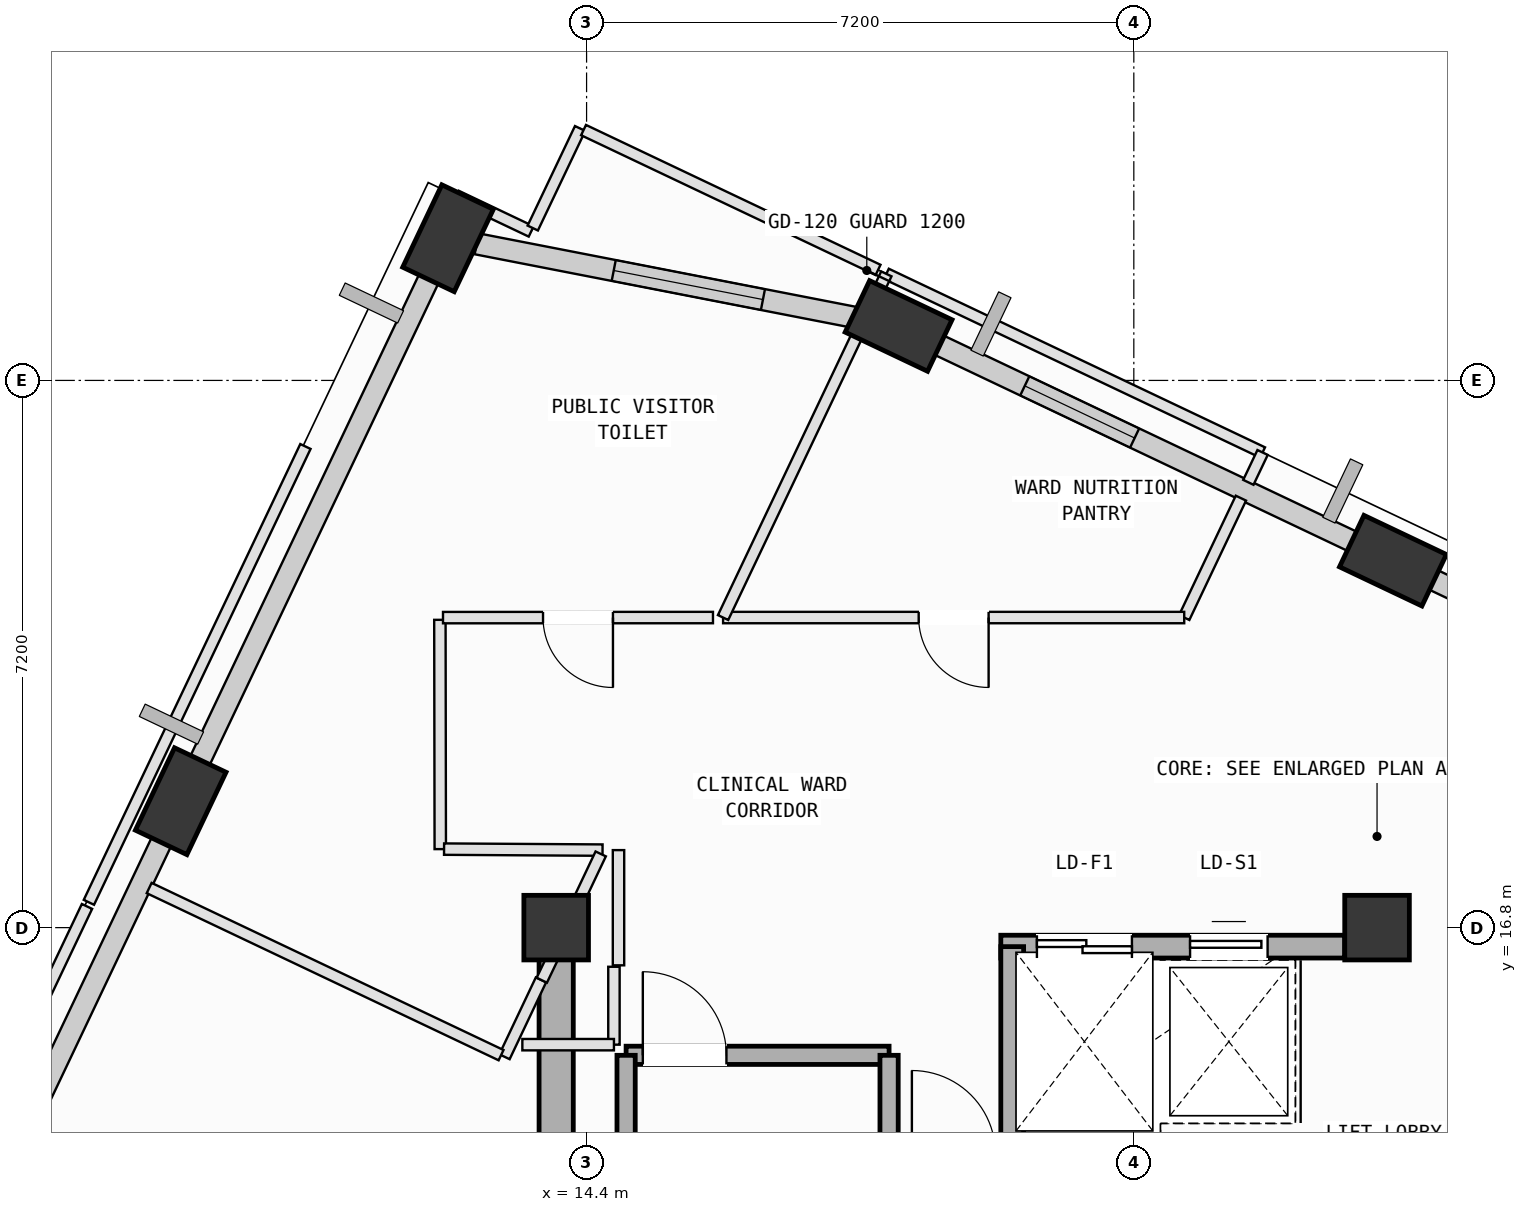
"""IFC4 building model, lengths in metres.
Left out: names, types, materials, properties, quantities, classifications, styles, units other than length and angle.
Written with IfcOpenShell. Run it as: python <this file> out.ifc"""

import sys

from ifc_helpers import new_model, si_unit, direction, frame, frame_2d, origin, origin_2d, place, context, subcontext, project, spatial, rectangle, extrude, element, fill, save


model = new_model("IFC4")
c1 = context("Model", 3, precision=1e-05, world=origin(), true_north=direction((0.0, 1.0)))
c2 = subcontext(c1, "Body", "Model", "MODEL_VIEW")
j1 = project(units=[si_unit("LENGTHUNIT", "METRE"), si_unit("PLANEANGLEUNIT", "RADIAN")], contexts=[c1])
p1 = place(None, origin())
s1 = spatial("IfcSite", under=j1, at=p1, CompositionType="ELEMENT")
p2 = place(p1, origin())
s2 = spatial("IfcBuilding", under=s1, at=p2, CompositionType="ELEMENT")
p3 = place(p2, frame((0.0, 0.0, 300.6)))
s3 = spatial("IfcBuildingStorey", under=s2, at=p3, CompositionType="ELEMENT", Elevation=300.6)
for number, where, z_axis, x_axis in (
    (1, (14.0, 16.8, 0.0), (0.0, 0.0, 1.0), (1.0, 0.0, 0.0)),
    (2, (24.8, 16.8, 0.0), (0.0, 0.0, 1.0), (1.0, 0.0, 0.0)),
):
    element("IfcColumn", number, at=place(p3, frame(where, z_axis=z_axis, x_axis=x_axis)), inside=s3, PredefinedType="COLUMN", context=c2, shape_type="SweptSolid", body=[
        extrude(rectangle(XDim=0.85, YDim=0.85, at=origin_2d()), origin(), (0.0, 0.0, 1.0), 4.0),
    ])
p4 = place(p3, frame((25.009, 21.628, 0.002), z_axis=(0.013491405719, -0.03546835621, 0.999279729445), x_axis=(-0.996704976374, 0.079462236708, 0.016277070029)))
e3 = element("IfcColumn", 3, at=p4, inside=s3, PredefinedType="COLUMN", context=c2, shape_type="SweptSolid", body=[
    extrude(rectangle(XDim=1.2, YDim=0.75, at=origin_2d()), origin(), (0.0, 0.0, 1.0), 3.999),
])
p5 = place(p3, frame((18.505, 24.717, 0.002), z_axis=(0.000853606278, -0.062435202046, 0.998048654576), x_axis=(-0.909103236129, 0.415708995205, 0.026783154524)))
e4 = element("IfcColumn", 4, at=p5, inside=s3, PredefinedType="COLUMN", context=c2, shape_type="SweptSolid", body=[
    extrude(rectangle(XDim=1.2, YDim=0.75, at=origin_2d()), origin(), (0.0, 0.0, 1.0), 4.004),
])
p6 = place(p3, frame((12.577, 25.871, 0.002), z_axis=(-0.003712450328, -0.086846993742, 0.996214744616), x_axis=(0.466977398551, 0.880775881553, 0.078523599749)))
e5 = element("IfcColumn", 5, at=p6, inside=s3, PredefinedType="COLUMN", context=c2, shape_type="SweptSolid", body=[
    extrude(rectangle(XDim=1.2, YDim=0.75, at=origin_2d()), origin(), (0.0, 0.0, 1.0), 4.011),
])
p7 = place(p3, frame((9.06, 18.463, 0.002), z_axis=(0.026915333163, -0.100917310121, 0.994530673915), x_axis=(0.182932695043, 0.978587726535, 0.094348770839)))
e6 = element("IfcColumn", 6, at=p7, inside=s3, PredefinedType="COLUMN", context=c2, shape_type="SweptSolid", body=[
    extrude(rectangle(XDim=1.2, YDim=0.75, at=origin_2d()), origin(), (0.0, 0.0, 1.0), 4.018),
])
p8 = place(p3, frame((25.415, 21.436, 0.0), z_axis=(0.0, 0.0, 1.0), x_axis=(0.903343787047, -0.428917244236, 0.0)))
e7 = element("IfcWall", 7, at=p8, inside=s3, PredefinedType="SOLIDWALL", context=c2, shape_type="SweptSolid", body=[
    extrude(rectangle(XDim=6.958, YDim=0.28, at=frame_2d((3.479, 0.0))), origin(), (0.0, 0.0, 1.0), 3.165),
])
p9 = place(p3, frame((18.899, 24.529, 0.0), z_axis=(0.0, 0.0, 1.0), x_axis=(0.903347453224, -0.428909522806, 0.0)))
e8 = element("IfcWall", 8, at=p9, inside=s3, PredefinedType="SOLIDWALL", context=c2, shape_type="SweptSolid", body=[
    extrude(rectangle(XDim=6.424, YDim=0.28, at=frame_2d((3.212, 0.0))), origin(), (0.0, 0.0, 1.0), 3.265),
])
p10 = place(p9, frame((1.401, 0.0, 0.75)))
e9 = element("IfcOpeningElement", 9, at=p10, cuts=e8, PredefinedType="OPENING", context=c2, shape_type="SweptSolid", body=[
    extrude(rectangle(XDim=1.6, YDim=1.95, at=frame_2d((0.8, 0.975))), frame((0.0, 0.15, 0.0), z_axis=(0.0, -1.0, 0.0), x_axis=(1.0, 0.0, 0.0)), (0.0, 0.0, 1.0), 0.3),
])
p11 = place(p3, frame((12.954, 25.798, 0.0), z_axis=(0.0, 0.0, 1.0), x_axis=(0.981565032418, -0.191128457152, 0.0)))
e10 = element("IfcWall", 10, at=p11, inside=s3, PredefinedType="SOLIDWALL", context=c2, shape_type="SweptSolid", body=[
    extrude(rectangle(XDim=5.302, YDim=0.28, at=frame_2d((2.651, 0.0))), origin(), (0.0, 0.0, 1.0), 3.265),
])
p12 = place(p11, frame((1.837, 0.0, 0.75)))
e11 = element("IfcOpeningElement", 11, at=p12, cuts=e10, PredefinedType="OPENING", context=c2, shape_type="SweptSolid", body=[
    extrude(rectangle(XDim=2.0, YDim=1.95, at=frame_2d((1.0, 0.975))), frame((0.0, 0.15, 0.0), z_axis=(0.0, -1.0, 0.0), x_axis=(1.0, 0.0, 0.0)), (0.0, 0.0, 1.0), 0.3),
])
p13 = place(p3, frame((9.152, 18.656, 0.0), z_axis=(0.0, 0.0, 1.0), x_axis=(0.428927525455, 0.903338905343, 0.0)))
e12 = element("IfcWall", 12, at=p13, inside=s3, PredefinedType="SOLIDWALL", context=c2, shape_type="SweptSolid", body=[
    extrude(rectangle(XDim=7.434, YDim=0.28, at=frame_2d((3.717, 0.0))), origin(), (0.0, 0.0, 1.0), 3.265),
])
p14 = place(p3, frame((5.621, 11.22, 0.0), z_axis=(0.0, 0.0, 1.0), x_axis=(0.428933056581, 0.903336279008, 0.0)))
e13 = element("IfcWall", 13, at=p14, inside=s3, PredefinedType="SOLIDWALL", context=c2, shape_type="SweptSolid", body=[
    extrude(rectangle(XDim=7.485, YDim=0.28, at=frame_2d((3.742, 0.0))), origin(), (0.0, 0.0, 1.0), 3.265),
])
p15 = place(p3, frame((14.92, 15.12, 0.0), z_axis=(0.0, 0.0, 1.0), x_axis=(1.0, 0.0, 0.0)))
e14 = element("IfcWall", 14, at=p15, inside=s3, PredefinedType="SOLIDWALL", context=c2, shape_type="SweptSolid", body=[
    extrude(rectangle(XDim=3.46, YDim=0.24, at=frame_2d((1.73, 0.0))), origin(), (0.0, 0.0, 1.0), 3.78),
])
p16 = place(p15, frame((0.22, 0.0, 0.0)))
e15 = element("IfcOpeningElement", 15, at=p16, cuts=e14, PredefinedType="OPENING", context=c2, shape_type="SweptSolid", body=[
    extrude(rectangle(XDim=1.1, YDim=2.15, at=frame_2d((0.55, 1.075))), frame((0.0, 0.13, 0.0), z_axis=(0.0, -1.0, 0.0), x_axis=(1.0, 0.0, 0.0)), (0.0, 0.0, 1.0), 0.26),
])
for number, where, z_axis, x_axis in (
    (16, (18.38, 15.12, 0.0), (0.0, 0.0, 1.0), (0.0, -1.0, 0.0)),
    (17, (14.92, 8.025, 0.0), (0.0, 0.0, 1.0), (0.0, 1.0, 0.0)),
):
    element("IfcWall", number, at=place(p3, frame(where, z_axis=z_axis, x_axis=x_axis)), inside=s3, PredefinedType="SOLIDWALL", context=c2, shape_type="SweptSolid", body=[
        extrude(rectangle(XDim=7.095, YDim=0.24, at=frame_2d((3.548, 0.0))), origin(), (0.0, 0.0, 1.0), 3.78),
    ])
p17 = place(p3, frame((14.0, 16.8, 0.0), z_axis=(0.0, 0.0, 1.0), x_axis=(0.0, -1.0, 0.0)))
e18 = element("IfcWall", 18, at=p17, inside=s3, PredefinedType="SHEAR", context=c2, shape_type="SweptSolid", body=[
    extrude(rectangle(XDim=9.0, YDim=0.45, at=frame_2d((4.5, 0.0))), origin(), (0.0, 0.0, 1.0), 3.78),
])
p18 = place(p3, frame((19.85, 16.55, 0.0), z_axis=(0.0, 0.0, 1.0), x_axis=(1.0, 0.0, 0.0)))
e19 = element("IfcWall", 19, at=p18, inside=s3, PredefinedType="SOLIDWALL", context=c2, shape_type="SweptSolid", body=[
    extrude(rectangle(XDim=4.525, YDim=0.3, at=frame_2d((2.262, 0.0))), origin(), (0.0, 0.0, 1.0), 3.78),
])
p19 = place(p18, frame((0.475, 0.0, 0.0)))
e20 = element("IfcOpeningElement", 20, at=p19, cuts=e19, PredefinedType="OPENING", context=c2, shape_type="SweptSolid", body=[
    extrude(rectangle(XDim=1.25, YDim=2.18, at=frame_2d((0.625, 1.09))), frame((0.0, 0.16, 0.0), z_axis=(0.0, -1.0, 0.0), x_axis=(1.0, 0.0, 0.0)), (0.0, 0.0, 1.0), 0.32),
])
p20 = place(p18, frame((2.49, 0.0, 0.0)))
e21 = element("IfcOpeningElement", 21, at=p20, cuts=e19, PredefinedType="OPENING", context=c2, shape_type="SweptSolid", body=[
    extrude(rectangle(XDim=1.02, YDim=2.12, at=frame_2d((0.51, 1.06))), frame((0.0, 0.16, 0.0), z_axis=(0.0, -1.0, 0.0), x_axis=(1.0, 0.0, 0.0)), (0.0, 0.0, 1.0), 0.32),
])
p21 = place(p3, frame((20.0, 13.82, 0.0), z_axis=(0.0, 0.0, 1.0), x_axis=(0.0, 1.0, 0.0)))
e22 = element("IfcWall", 22, at=p21, inside=s3, PredefinedType="SOLIDWALL", context=c2, shape_type="SweptSolid", body=[
    extrude(rectangle(XDim=2.73, YDim=0.3, at=frame_2d((1.365, 0.0))), origin(), (0.0, 0.0, 1.0), 3.78),
])
p22 = place(p3, frame((18.344, 25.402, 0.0), z_axis=(0.0, 0.0, 1.0), x_axis=(0.90335735186, -0.42888867418, 0.0)))
e23 = element("IfcWall", 23, at=p22, inside=s3, PredefinedType="PARTITIONING", context=c2, shape_type="SweptSolid", body=[
    extrude(rectangle(XDim=5.479, YDim=0.15, at=frame_2d((2.74, 0.0))), origin(), (0.0, 0.0, 1.0), 3.78),
])
p23 = place(p3, frame((23.294, 23.052, 0.0), z_axis=(0.0, 0.0, 1.0), x_axis=(-0.429628756121, -0.903005610123, 0.0)))
e24 = element("IfcWall", 24, at=p23, inside=s3, PredefinedType="PARTITIONING", context=c2, shape_type="SweptSolid", body=[
    extrude(rectangle(XDim=0.435, YDim=0.15, at=frame_2d((0.218, 0.0))), origin(), (0.0, 0.0, 1.0), 3.78),
])
p24 = place(p3, frame((23.009, 22.451, 0.0), z_axis=(0.0, 0.0, 1.0), x_axis=(-0.428985229974, -0.90331150356, 0.0)))
e25 = element("IfcWall", 25, at=p24, inside=s3, PredefinedType="PARTITIONING", context=c2, shape_type="SweptSolid", body=[
    extrude(rectangle(XDim=1.739, YDim=0.15, at=frame_2d((0.87, 0.0))), origin(), (0.0, 0.0, 1.0), 3.78),
])
p25 = place(p3, frame((22.263, 20.88, 0.0), z_axis=(0.0, 0.0, 1.0), x_axis=(-1.0, 0.0, 0.0)))
e26 = element("IfcWall", 26, at=p25, inside=s3, PredefinedType="PARTITIONING", context=c2, shape_type="SweptSolid", body=[
    extrude(rectangle(XDim=6.067, YDim=0.15, at=frame_2d((3.033, 0.0))), origin(), (0.0, 0.0, 1.0), 3.415),
])
p26 = place(p25, frame((2.573, 0.0, 0.0)))
e27 = element("IfcOpeningElement", 27, at=p26, cuts=e26, PredefinedType="OPENING", context=c2, shape_type="SweptSolid", body=[
    extrude(rectangle(XDim=0.92, YDim=2.1, at=frame_2d((0.46, 1.05))), frame((0.0, 0.085, 0.0), z_axis=(0.0, -1.0, 0.0), x_axis=(1.0, 0.0, 0.0)), (0.0, 0.0, 1.0), 0.17),
])
p27 = place(p3, frame((16.196, 20.88, 0.0), z_axis=(0.0, 0.0, 1.0), x_axis=(0.429116927293, 0.903248948359, 0.0)))
e28 = element("IfcWall", 28, at=p27, inside=s3, PredefinedType="PARTITIONING", context=c2, shape_type="SweptSolid", body=[
    extrude(rectangle(XDim=4.225, YDim=0.15, at=frame_2d((2.112, 0.0))), origin(), (0.0, 0.0, 1.0), 3.78),
])
p28 = place(p3, frame((18.111, 24.911, 0.0), z_axis=(0.0, 0.0, 1.0), x_axis=(0.428433800596, 0.903573172746, 0.0)))
e29 = element("IfcWall", 29, at=p28, inside=s3, PredefinedType="PARTITIONING", context=c2, shape_type="SweptSolid", body=[
    extrude(rectangle(XDim=0.544, YDim=0.15, at=frame_2d((0.272, 0.0))), origin(), (0.0, 0.0, 1.0), 3.78),
])
p29 = place(p3, frame((12.47, 20.85, 0.0), z_axis=(0.0, 0.0, 1.0), x_axis=(0.001699301641, -0.999998556186, 0.0)))
e30 = element("IfcWall", 30, at=p29, inside=s3, PredefinedType="PARTITIONING", context=c2, shape_type="SweptSolid", body=[
    extrude(rectangle(XDim=3.017, YDim=0.15, at=frame_2d((1.509, 0.0))), origin(), (0.0, 0.0, 1.0), 3.415),
])
p30 = place(p3, frame((12.525, 17.833, 0.0), z_axis=(0.0, 0.0, 1.0), x_axis=(0.999980747295, -0.0062052429, 0.0)))
e31 = element("IfcWall", 31, at=p30, inside=s3, PredefinedType="PARTITIONING", context=c2, shape_type="SweptSolid", body=[
    extrude(rectangle(XDim=2.085, YDim=0.15, at=frame_2d((1.042, 0.0))), origin(), (0.0, 0.0, 1.0), 3.78),
])
p31 = place(p3, frame((14.586, 17.77, 0.0), z_axis=(0.0, 0.0, 1.0), x_axis=(-0.428271414161, -0.903650151227, 0.0)))
e32 = element("IfcWall", 32, at=p31, inside=s3, PredefinedType="PARTITIONING", context=c2, shape_type="SweptSolid", body=[
    extrude(rectangle(XDim=0.964, YDim=0.15, at=frame_2d((0.482, 0.0))), origin(), (0.0, 0.0, 1.0), 3.78),
])
p32 = place(p3, frame((13.8, 16.113, 0.0), z_axis=(0.0, 0.0, 1.0), x_axis=(-0.428545424875, -0.903520237083, 0.0)))
e33 = element("IfcWall", 33, at=p32, inside=s3, PredefinedType="PARTITIONING", context=c2, shape_type="SweptSolid", body=[
    extrude(rectangle(XDim=1.12, YDim=0.15, at=frame_2d((0.56, 0.0))), origin(), (0.0, 0.0, 1.0), 3.78),
])
p33 = place(p3, frame((13.275, 15.122, 0.0), z_axis=(0.0, 0.0, 1.0), x_axis=(-0.903294117812, 0.42902183712, 0.0)))
e34 = element("IfcWall", 34, at=p33, inside=s3, PredefinedType="PARTITIONING", context=c2, shape_type="SweptSolid", body=[
    extrude(rectangle(XDim=5.125, YDim=0.15, at=frame_2d((2.563, 0.0))), origin(), (0.0, 0.0, 1.0), 3.78),
])
p34 = place(p3, frame((8.659, 18.063, 0.0), z_axis=(0.0, 0.0, 1.0), x_axis=(0.42948980012, 0.903071708998, 0.0)))
e35 = element("IfcWall", 35, at=p34, inside=s3, PredefinedType="PARTITIONING", context=c2, shape_type="SweptSolid", body=[
    extrude(rectangle(XDim=0.748, YDim=0.15, at=frame_2d((0.374, 0.0))), origin(), (0.0, 0.0, 1.0), 3.78),
])
p35 = place(p3, frame((12.168, 25.454, 0.0), z_axis=(0.0, 0.0, 1.0), x_axis=(0.429486205046, 0.903073418762, 0.0)))
e36 = element("IfcWall", 36, at=p35, inside=s3, PredefinedType="PARTITIONING", context=c2, shape_type="SweptSolid", body=[
    extrude(rectangle(XDim=1.102, YDim=0.15, at=frame_2d((0.551, 0.0))), origin(), (0.0, 0.0, 1.0), 3.265),
])
p36 = place(p3, frame((12.686, 26.428, 0.0), z_axis=(0.0, 0.0, 1.0), x_axis=(0.903203733751, -0.429212086664, 0.0)))
e37 = element("IfcWall", 37, at=p36, inside=s3, PredefinedType="PARTITIONING", context=c2, shape_type="SweptSolid", body=[
    extrude(rectangle(XDim=1.09, YDim=0.15, at=frame_2d((0.545, 0.0))), origin(), (0.0, 0.0, 1.0), 3.78),
])
p37 = place(p3, frame((13.692, 26.005, 0.0), z_axis=(0.0, 0.0, 1.0), x_axis=(0.429489303732, 0.903071945074, 0.0)))
e38 = element("IfcWall", 38, at=p37, inside=s3, PredefinedType="PARTITIONING", context=c2, shape_type="SweptSolid", body=[
    extrude(rectangle(XDim=1.451, YDim=0.15, at=frame_2d((0.725, 0.0))), origin(), (0.0, 0.0, 1.0), 3.78),
])
p38 = place(p3, frame((14.36, 27.294, 0.0), z_axis=(0.0, 0.0, 1.0), x_axis=(0.903348076648, -0.428908209779, 0.0)))
e39 = element("IfcWall", 39, at=p38, inside=s3, PredefinedType="PARTITIONING", context=c2, shape_type="SweptSolid", body=[
    extrude(rectangle(XDim=4.29, YDim=0.15, at=frame_2d((2.145, 0.0))), origin(), (0.0, 0.0, 1.0), 3.78),
])
p39 = place(p3, frame((16.063, 20.88, 0.0), z_axis=(0.0, 0.0, 1.0), x_axis=(-0.999999962206, -0.000274932975, 0.0)))
e40 = element("IfcWall", 40, at=p39, inside=s3, PredefinedType="PARTITIONING", context=c2, shape_type="SweptSolid", body=[
    extrude(rectangle(XDim=3.552, YDim=0.15, at=frame_2d((1.776, 0.0))), origin(), (0.0, 0.0, 1.0), 3.415),
])
p40 = place(p39, frame((1.316, 0.0, 0.0)))
e41 = element("IfcOpeningElement", 41, at=p40, cuts=e40, PredefinedType="OPENING", context=c2, shape_type="SweptSolid", body=[
    extrude(rectangle(XDim=0.92, YDim=2.1, at=frame_2d((0.46, 1.05))), frame((0.0, 0.085, 0.0), z_axis=(0.0, -1.0, 0.0), x_axis=(1.0, 0.0, 0.0)), (0.0, 0.0, 1.0), 0.17),
])
p41 = place(p3, frame((4.979, 11.081, 0.0), z_axis=(0.0, 0.0, 1.0), x_axis=(0.428912807324, 0.903345893727, 0.0)))
e42 = element("IfcWall", 42, at=p41, inside=s3, PredefinedType="PARTITIONING", context=c2, shape_type="SweptSolid", body=[
    extrude(rectangle(XDim=6.64, YDim=0.15, at=frame_2d((3.32, 0.0))), origin(), (0.0, 0.0, 1.0), 3.78),
])
p42 = place(p3, frame((14.76, 16.285, 0.0), z_axis=(0.0, 0.0, 1.0), x_axis=(0.0, -1.0, 0.0)))
e43 = element("IfcWall", 43, at=p42, inside=s3, PredefinedType="PARTITIONING", context=c2, shape_type="SweptSolid", body=[
    extrude(rectangle(XDim=1.025, YDim=0.15, at=frame_2d((0.512, 0.0))), origin(), (0.0, 0.0, 1.0), 3.78),
])
p43 = place(p3, frame((14.76, 15.26, 0.0), z_axis=(0.0, 0.0, 1.0), x_axis=(-1.0, 0.0, 0.0)))
e44 = element("IfcWall", 44, at=p43, inside=s3, PredefinedType="PARTITIONING", context=c2, shape_type="SweptSolid", body=[
    extrude(rectangle(XDim=1.205, YDim=0.15, at=frame_2d((0.603, 0.0))), origin(), (0.0, 0.0, 1.0), 3.78),
])
p44 = place(p3, frame((7.852, 17.133, 0.0), z_axis=(0.0, 0.0, 1.0), x_axis=(0.429032815632, 0.903288903458, 0.0)))
e45 = element("IfcWall", 45, at=p44, inside=s3, PredefinedType="PARTITIONING", context=c2, shape_type="SweptSolid", body=[
    extrude(rectangle(XDim=6.64, YDim=0.15, at=frame_2d((3.32, 0.0))), origin(), (0.0, 0.0, 1.0), 3.78),
])
p45 = place(p3, frame((13.811, 16.108, 0.0), z_axis=(0.0, 0.0, 1.0), x_axis=(0.431892084919, 0.901925289026, 0.0)))
e46 = element("IfcWall", 46, at=p45, inside=s3, PredefinedType="PARTITIONING", context=c2, shape_type="SweptSolid", body=[
    extrude(rectangle(XDim=0.871, YDim=0.15, at=frame_2d((0.435, 0.0))), origin(), (0.0, 0.0, 1.0), 3.78),
])
p46 = place(p3, frame((14.82, 17.82, 0.0), z_axis=(0.0, 0.0, 1.0), x_axis=(0.0, -1.0, 0.0)))
e47 = element("IfcWall", 47, at=p46, inside=s3, PredefinedType="PARTITIONING", context=c2, shape_type="SweptSolid", body=[
    extrude(rectangle(XDim=1.516, YDim=0.15, at=frame_2d((0.758, 0.0))), origin(), (0.0, 0.0, 1.0), 3.78),
])
p47 = place(p10, origin())
e48 = element("IfcWindow", 48, at=p47, inside=s3, PartitioningType="SINGLE_PANEL", PredefinedType="WINDOW", context=c2, shape_type="SweptSolid", body=[
    extrude(rectangle(XDim=1.6, YDim=1.95, at=frame_2d((0.8, 0.975))), frame((0.0, 0.03, 0.0), z_axis=(0.0, -1.0, 0.0), x_axis=(1.0, 0.0, 0.0)), (0.0, 0.0, 1.0), 0.06),
])
fill(e9, e48)
p48 = place(p12, origin())
e49 = element("IfcWindow", 49, at=p48, inside=s3, PartitioningType="SINGLE_PANEL", PredefinedType="WINDOW", context=c2, shape_type="SweptSolid", body=[
    extrude(rectangle(XDim=2.0, YDim=1.95, at=frame_2d((1.0, 0.975))), frame((0.0, 0.03, 0.0), z_axis=(0.0, -1.0, 0.0), x_axis=(1.0, 0.0, 0.0)), (0.0, 0.0, 1.0), 0.06),
])
fill(e11, e49)
p49 = place(p16, origin())
e50 = element("IfcDoor", 50, at=p49, inside=s3, OperationType="SINGLE_SWING_LEFT", PredefinedType="DOOR", context=c2, shape_type="SweptSolid", body=[
    extrude(rectangle(XDim=1.1, YDim=2.15, at=frame_2d((0.55, 1.075))), frame((0.0, 0.025, 0.0), z_axis=(0.0, -1.0, 0.0), x_axis=(1.0, 0.0, 0.0)), (0.0, 0.0, 1.0), 0.05),
])
fill(e15, e50)
p50 = place(p19, origin())
e51 = element("IfcDoor", 51, at=p50, inside=s3, OperationType="DOUBLE_DOOR_SLIDING", PredefinedType="DOOR", context=c2, shape_type="SweptSolid", body=[
    extrude(rectangle(XDim=1.25, YDim=2.18, at=frame_2d((0.625, 1.09))), frame((0.0, 0.025, 0.0), z_axis=(0.0, -1.0, 0.0), x_axis=(1.0, 0.0, 0.0)), (0.0, 0.0, 1.0), 0.05),
])
fill(e20, e51)
p51 = place(p20, origin())
e52 = element("IfcDoor", 52, at=p51, inside=s3, OperationType="SLIDING_TO_LEFT", PredefinedType="DOOR", context=c2, shape_type="SweptSolid", body=[
    extrude(rectangle(XDim=1.02, YDim=2.12, at=frame_2d((0.51, 1.06))), frame((0.0, 0.025, 0.0), z_axis=(0.0, -1.0, 0.0), x_axis=(1.0, 0.0, 0.0)), (0.0, 0.0, 1.0), 0.05),
])
fill(e21, e52)
p52 = place(p26, origin())
e53 = element("IfcDoor", 53, at=p52, inside=s3, OperationType="SINGLE_SWING_LEFT", PredefinedType="DOOR", context=c2, shape_type="SweptSolid", body=[
    extrude(rectangle(XDim=0.92, YDim=2.1, at=frame_2d((0.46, 1.05))), frame((0.0, 0.025, 0.0), z_axis=(0.0, -1.0, 0.0), x_axis=(1.0, 0.0, 0.0)), (0.0, 0.0, 1.0), 0.05),
])
fill(e27, e53)
p53 = place(p40, origin())
e54 = element("IfcDoor", 54, at=p53, inside=s3, OperationType="SINGLE_SWING_LEFT", PredefinedType="DOOR", context=c2, shape_type="SweptSolid", body=[
    extrude(rectangle(XDim=0.92, YDim=2.1, at=frame_2d((0.46, 1.05))), frame((0.0, 0.025, 0.0), z_axis=(0.0, -1.0, 0.0), x_axis=(1.0, 0.0, 0.0)), (0.0, 0.0, 1.0), 0.05),
])
fill(e41, e54)
save(model, sys.argv[1])
